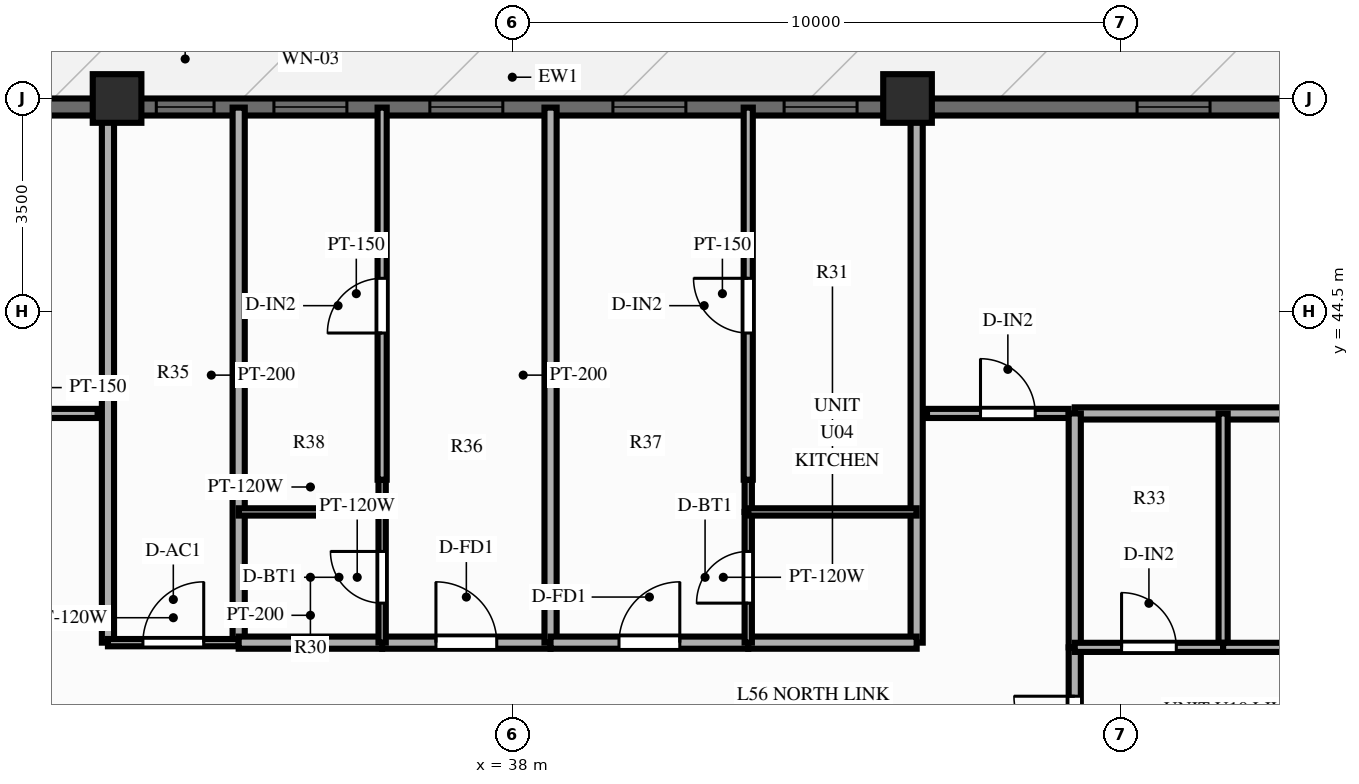
"""IFC4 building model, lengths in metres.
Left out: names, types, materials, properties, quantities, classifications, styles, units other than length and angle.
Written with IfcOpenShell. Run it as: python <this file> out.ifc"""

import sys

from ifc_helpers import new_model, si_unit, direction, frame, frame_2d, origin, origin_2d, place, context, subcontext, project, spatial, rectangle, extrude, source, transform, mapped, element, fill, save


model = new_model("IFC4")
c1 = context("Model", 3, precision=1e-05, world=origin(), true_north=direction((0.0, 1.0)))
c2 = subcontext(c1, "Body", "Model", "MODEL_VIEW")
j1 = project(units=[si_unit("LENGTHUNIT", "METRE"), si_unit("PLANEANGLEUNIT", "RADIAN")], contexts=[c1])
p1 = place(None, origin())
s1 = spatial("IfcSite", under=j1, at=p1, CompositionType="ELEMENT")
p2 = place(p1, origin())
s2 = spatial("IfcBuilding", under=s1, at=p2, CompositionType="ELEMENT")
p3 = place(p2, frame((0.0, 0.0, 179.8)))
s3 = spatial("IfcBuildingStorey", under=s2, at=p3, CompositionType="ELEMENT", Elevation=179.8)
m1 = source(origin(), c2, "Body", "SweptSolid", [
    extrude(rectangle(XDim=0.8, YDim=0.8, at=origin_2d()), origin(), (0.0, 0.0, 1.0), 3.0),
])
for number, where, z_axis, x_axis in (
    (1, (44.5, 48.0, 0.0), (0.0, 0.0, 1.0), (1.0, 0.0, 0.0)),
    (2, (31.5, 48.0, 0.0), (0.0, 0.0, 1.0), (1.0, 0.0, 0.0)),
):
    element("IfcColumn", number, at=place(p3, frame(where, z_axis=z_axis, x_axis=x_axis)), inside=s3, PredefinedType="COLUMN", context=c2, shape_type="MappedRepresentation", body=[
        mapped(m1, transform((0.0, 0.0, 0.0), scale=1.0)),
    ])
p4 = place(p3, frame((22.75, 47.86, 0.0), z_axis=(0.0, 0.0, 1.0), x_axis=(1.0, 0.0, 0.0)))
e3 = element("IfcWall", 3, at=p4, inside=s3, PredefinedType="SOLIDWALL", context=c2, shape_type="SweptSolid", body=[
    extrude(rectangle(XDim=30.5, YDim=0.28, at=frame_2d((15.25, 0.0))), origin(), (0.0, 0.0, 1.0), 2.28),
])
p5 = place(p4, frame((3.825, 0.0, 0.0)))
e4 = element("IfcOpeningElement", 4, at=p5, cuts=e3, PredefinedType="OPENING", context=c2, shape_type="SweptSolid", body=[
    extrude(rectangle(XDim=1.1, YDim=2.15, at=frame_2d((0.55, 1.075))), frame((0.0, 0.152, 0.0), z_axis=(0.0, -1.0, 0.0), x_axis=(1.0, 0.0, 0.0)), (0.0, 0.0, 1.0), 0.304),
])
p6 = place(p4, frame((9.395, 0.0, 0.25)))
e5 = element("IfcOpeningElement", 5, at=p6, cuts=e3, PredefinedType="OPENING", context=c2, shape_type="SweptSolid", body=[
    extrude(rectangle(XDim=0.95, YDim=1.5, at=frame_2d((0.475, 0.75))), frame((0.0, 0.152, 0.0), z_axis=(0.0, -1.0, 0.0), x_axis=(1.0, 0.0, 0.0)), (0.0, 0.0, 1.0), 0.304),
])
p7 = place(p4, frame((11.33, 0.0, 0.25)))
e6 = element("IfcOpeningElement", 6, at=p7, cuts=e3, PredefinedType="OPENING", context=c2, shape_type="SweptSolid", body=[
    extrude(rectangle(XDim=1.2, YDim=1.5, at=frame_2d((0.6, 0.75))), frame((0.0, 0.152, 0.0), z_axis=(0.0, -1.0, 0.0), x_axis=(1.0, 0.0, 0.0)), (0.0, 0.0, 1.0), 0.304),
])
p8 = place(p4, frame((13.894, 0.0, 0.25)))
e7 = element("IfcOpeningElement", 7, at=p8, cuts=e3, PredefinedType="OPENING", context=c2, shape_type="SweptSolid", body=[
    extrude(rectangle(XDim=1.2, YDim=1.5, at=frame_2d((0.6, 0.75))), frame((0.0, 0.152, 0.0), z_axis=(0.0, -1.0, 0.0), x_axis=(1.0, 0.0, 0.0)), (0.0, 0.0, 1.0), 0.304),
])
p9 = place(p4, frame((16.905, 0.0, 0.25)))
e8 = element("IfcOpeningElement", 8, at=p9, cuts=e3, PredefinedType="OPENING", context=c2, shape_type="SweptSolid", body=[
    extrude(rectangle(XDim=1.2, YDim=1.5, at=frame_2d((0.6, 0.75))), frame((0.0, 0.152, 0.0), z_axis=(0.0, -1.0, 0.0), x_axis=(1.0, 0.0, 0.0)), (0.0, 0.0, 1.0), 0.304),
])
p10 = place(p4, frame((19.72, 0.0, 0.25)))
e9 = element("IfcOpeningElement", 9, at=p10, cuts=e3, PredefinedType="OPENING", context=c2, shape_type="SweptSolid", body=[
    extrude(rectangle(XDim=1.2, YDim=1.5, at=frame_2d((0.6, 0.75))), frame((0.0, 0.152, 0.0), z_axis=(0.0, -1.0, 0.0), x_axis=(1.0, 0.0, 0.0)), (0.0, 0.0, 1.0), 0.304),
])
p11 = place(p4, frame((25.525, 0.0, 0.25)))
e10 = element("IfcOpeningElement", 10, at=p11, cuts=e3, PredefinedType="OPENING", context=c2, shape_type="SweptSolid", body=[
    extrude(rectangle(XDim=1.2, YDim=1.5, at=frame_2d((0.6, 0.75))), frame((0.0, 0.152, 0.0), z_axis=(0.0, -1.0, 0.0), x_axis=(1.0, 0.0, 0.0)), (0.0, 0.0, 1.0), 0.304),
])
p12 = place(p3, frame((28.85, 42.82, 0.0), z_axis=(0.0, 0.0, 1.0), x_axis=(1.0, 0.0, 0.0)))
e11 = element("IfcWall", 11, at=p12, inside=s3, PredefinedType="PARTITIONING", context=c2, shape_type="SweptSolid", body=[
    extrude(rectangle(XDim=2.33, YDim=0.15, at=frame_2d((1.165, 0.0))), origin(), (0.0, 0.0, 1.0), 2.79),
])
p13 = place(p12, frame((0.55, 0.0, 0.0)))
e12 = element("IfcOpeningElement", 12, at=p13, cuts=e11, PredefinedType="OPENING", context=c2, shape_type="SweptSolid", body=[
    extrude(rectangle(XDim=0.9, YDim=2.1, at=frame_2d((0.45, 1.05))), frame((0.0, 0.087, 0.0), z_axis=(0.0, -1.0, 0.0), x_axis=(1.0, 0.0, 0.0)), (0.0, 0.0, 1.0), 0.174),
])
p14 = place(p3, frame((44.82, 42.82, 0.0), z_axis=(0.0, 0.0, 1.0), x_axis=(1.0, 0.0, 0.0)))
e13 = element("IfcWall", 13, at=p14, inside=s3, PredefinedType="PARTITIONING", context=c2, shape_type="SweptSolid", body=[
    extrude(rectangle(XDim=2.33, YDim=0.15, at=frame_2d((1.165, 0.0))), origin(), (0.0, 0.0, 1.0), 2.79),
])
p15 = place(p14, frame((0.88, 0.0, 0.0)))
e14 = element("IfcOpeningElement", 14, at=p15, cuts=e13, PredefinedType="OPENING", context=c2, shape_type="SweptSolid", body=[
    extrude(rectangle(XDim=0.9, YDim=2.1, at=frame_2d((0.45, 1.05))), frame((0.0, 0.087, 0.0), z_axis=(0.0, -1.0, 0.0), x_axis=(1.0, 0.0, 0.0)), (0.0, 0.0, 1.0), 0.174),
])
for number, where, z_axis, x_axis in (
    (15, (31.35, 39.05, 0.0), (0.0, 0.0, 1.0), (0.0, 1.0, 0.0)),
    (16, (44.65, 39.05, 0.0), (0.0, 0.0, 1.0), (0.0, 1.0, 0.0)),
):
    element("IfcWall", number, at=place(p3, frame(where, z_axis=z_axis, x_axis=x_axis)), inside=s3, PredefinedType="PARTITIONING", context=c2, shape_type="SweptSolid", body=[
        extrude(rectangle(XDim=8.8, YDim=0.2, at=frame_2d((4.4, 0.0))), origin(), (0.0, 0.0, 1.0), 2.39),
    ])
p16 = place(p3, frame((33.5, 39.05, 0.0), z_axis=(0.0, 0.0, 1.0), x_axis=(0.0, 1.0, 0.0)))
e17 = element("IfcWall", 17, at=p16, inside=s3, PredefinedType="PARTITIONING", context=c2, shape_type="SweptSolid", body=[
    extrude(rectangle(XDim=8.8, YDim=0.2, at=frame_2d((4.4, 0.0))), origin(), (0.0, 0.0, 1.0), 2.79),
])
p17 = place(p3, frame((31.35, 39.05, 0.0), z_axis=(0.0, 0.0, 1.0), x_axis=(1.0, 0.0, 0.0)))
e18 = element("IfcWall", 18, at=p17, inside=s3, PredefinedType="PARTITIONING", context=c2, shape_type="SweptSolid", body=[
    extrude(rectangle(XDim=2.15, YDim=0.12, at=frame_2d((1.075, 0.0))), origin(), (0.0, 0.0, 1.0), 2.79),
])
p18 = place(p17, frame((0.575, 0.0, 0.0)))
e19 = element("IfcOpeningElement", 19, at=p18, cuts=e18, PredefinedType="OPENING", context=c2, shape_type="SweptSolid", body=[
    extrude(rectangle(XDim=1.0, YDim=2.1, at=frame_2d((0.5, 1.05))), frame((0.0, 0.072, 0.0), z_axis=(0.0, -1.0, 0.0), x_axis=(1.0, 0.0, 0.0)), (0.0, 0.0, 1.0), 0.144),
])
p19 = place(p3, frame((33.5, 39.05, 0.0), z_axis=(0.0, 0.0, 1.0), x_axis=(1.0, 0.0, 0.0)))
e20 = element("IfcWall", 20, at=p19, inside=s3, PredefinedType="PARTITIONING", context=c2, shape_type="SweptSolid", body=[
    extrude(rectangle(XDim=2.359, YDim=0.2, at=frame_2d((1.18, 0.0))), origin(), (0.0, 0.0, 1.0), 2.79),
])
p20 = place(p3, frame((35.859, 39.05, 0.0), z_axis=(0.0, 0.0, 1.0), x_axis=(1.0, 0.0, 0.0)))
e21 = element("IfcWall", 21, at=p20, inside=s3, PredefinedType="PARTITIONING", context=c2, shape_type="SweptSolid", body=[
    extrude(rectangle(XDim=2.77, YDim=0.2, at=frame_2d((1.385, 0.0))), origin(), (0.0, 0.0, 1.0), 2.79),
])
p21 = place(p20, frame((0.885, 0.0, 0.0)))
e22 = element("IfcOpeningElement", 22, at=p21, cuts=e21, PredefinedType="OPENING", context=c2, shape_type="SweptSolid", body=[
    extrude(rectangle(XDim=1.0, YDim=2.15, at=frame_2d((0.5, 1.075))), frame((0.0, 0.112, 0.0), z_axis=(0.0, -1.0, 0.0), x_axis=(1.0, 0.0, 0.0)), (0.0, 0.0, 1.0), 0.224),
])
p22 = place(p3, frame((35.859, 39.05, 0.0), z_axis=(0.0, 0.0, 1.0), x_axis=(0.0, 1.0, 0.0)))
e23 = element("IfcWall", 23, at=p22, inside=s3, PredefinedType="PARTITIONING", context=c2, shape_type="SweptSolid", body=[
    extrude(rectangle(XDim=2.15, YDim=0.12, at=frame_2d((1.075, 0.0))), origin(), (0.0, 0.0, 1.0), 2.79),
])
p23 = place(p22, frame((0.65, 0.0, 0.0)))
e24 = element("IfcOpeningElement", 24, at=p23, cuts=e23, PredefinedType="OPENING", context=c2, shape_type="SweptSolid", body=[
    extrude(rectangle(XDim=0.85, YDim=2.05, at=frame_2d((0.425, 1.025))), frame((0.0, 0.072, 0.0), z_axis=(0.0, -1.0, 0.0), x_axis=(1.0, 0.0, 0.0)), (0.0, 0.0, 1.0), 0.144),
])
p24 = place(p3, frame((35.859, 41.2, 0.0), z_axis=(0.0, 0.0, 1.0), x_axis=(0.0, 1.0, 0.0)))
e25 = element("IfcWall", 25, at=p24, inside=s3, PredefinedType="PARTITIONING", context=c2, shape_type="SweptSolid", body=[
    extrude(rectangle(XDim=0.53, YDim=0.12, at=frame_2d((0.265, 0.0))), origin(), (0.0, 0.0, 1.0), 2.79),
])
p25 = place(p3, frame((33.5, 41.2, 0.0), z_axis=(0.0, 0.0, 1.0), x_axis=(1.0, 0.0, 0.0)))
e26 = element("IfcWall", 26, at=p25, inside=s3, PredefinedType="PARTITIONING", context=c2, shape_type="SweptSolid", body=[
    extrude(rectangle(XDim=2.359, YDim=0.12, at=frame_2d((1.18, 0.0))), origin(), (0.0, 0.0, 1.0), 2.79),
])
p26 = place(p3, frame((35.859, 41.73, 0.0), z_axis=(0.0, 0.0, 1.0), x_axis=(0.0, 1.0, 0.0)))
e27 = element("IfcWall", 27, at=p26, inside=s3, PredefinedType="PARTITIONING", context=c2, shape_type="SweptSolid", body=[
    extrude(rectangle(XDim=6.12, YDim=0.15, at=frame_2d((3.06, 0.0))), origin(), (0.0, 0.0, 1.0), 2.79),
])
p27 = place(p26, frame((2.413, 0.0, 0.0)))
e28 = element("IfcOpeningElement", 28, at=p27, cuts=e27, PredefinedType="OPENING", context=c2, shape_type="SweptSolid", body=[
    extrude(rectangle(XDim=0.9, YDim=2.1, at=frame_2d((0.45, 1.05))), frame((0.0, 0.087, 0.0), z_axis=(0.0, -1.0, 0.0), x_axis=(1.0, 0.0, 0.0)), (0.0, 0.0, 1.0), 0.174),
])
p28 = place(p3, frame((38.629, 39.05, 0.0), z_axis=(0.0, 0.0, 1.0), x_axis=(0.0, 1.0, 0.0)))
e29 = element("IfcWall", 29, at=p28, inside=s3, PredefinedType="PARTITIONING", context=c2, shape_type="SweptSolid", body=[
    extrude(rectangle(XDim=8.8, YDim=0.2, at=frame_2d((4.4, 0.0))), origin(), (0.0, 0.0, 1.0), 2.79),
])
p29 = place(p3, frame((38.629, 39.05, 0.0), z_axis=(0.0, 0.0, 1.0), x_axis=(1.0, 0.0, 0.0)))
e30 = element("IfcWall", 30, at=p29, inside=s3, PredefinedType="PARTITIONING", context=c2, shape_type="SweptSolid", body=[
    extrude(rectangle(XDim=3.251, YDim=0.2, at=frame_2d((1.626, 0.0))), origin(), (0.0, 0.0, 1.0), 2.79),
])
p30 = place(p29, frame((1.126, 0.0, 0.0)))
e31 = element("IfcOpeningElement", 31, at=p30, cuts=e30, PredefinedType="OPENING", context=c2, shape_type="SweptSolid", body=[
    extrude(rectangle(XDim=1.0, YDim=2.15, at=frame_2d((0.5, 1.075))), frame((0.0, 0.112, 0.0), z_axis=(0.0, -1.0, 0.0), x_axis=(1.0, 0.0, 0.0)), (0.0, 0.0, 1.0), 0.224),
])
p31 = place(p3, frame((41.88, 39.05, 0.0), z_axis=(0.0, 0.0, 1.0), x_axis=(1.0, 0.0, 0.0)))
e32 = element("IfcWall", 32, at=p31, inside=s3, PredefinedType="PARTITIONING", context=c2, shape_type="SweptSolid", body=[
    extrude(rectangle(XDim=2.77, YDim=0.2, at=frame_2d((1.385, 0.0))), origin(), (0.0, 0.0, 1.0), 2.79),
])
p32 = place(p3, frame((41.88, 39.05, 0.0), z_axis=(0.0, 0.0, 1.0), x_axis=(0.0, 1.0, 0.0)))
e33 = element("IfcWall", 33, at=p32, inside=s3, PredefinedType="PARTITIONING", context=c2, shape_type="SweptSolid", body=[
    extrude(rectangle(XDim=2.15, YDim=0.12, at=frame_2d((1.075, 0.0))), origin(), (0.0, 0.0, 1.0), 2.79),
])
p33 = place(p32, frame((0.65, 0.0, 0.0)))
e34 = element("IfcOpeningElement", 34, at=p33, cuts=e33, PredefinedType="OPENING", context=c2, shape_type="SweptSolid", body=[
    extrude(rectangle(XDim=0.85, YDim=2.05, at=frame_2d((0.425, 1.025))), frame((0.0, 0.072, 0.0), z_axis=(0.0, -1.0, 0.0), x_axis=(1.0, 0.0, 0.0)), (0.0, 0.0, 1.0), 0.144),
])
p34 = place(p3, frame((41.88, 41.2, 0.0), z_axis=(0.0, 0.0, 1.0), x_axis=(0.0, 1.0, 0.0)))
e35 = element("IfcWall", 35, at=p34, inside=s3, PredefinedType="PARTITIONING", context=c2, shape_type="SweptSolid", body=[
    extrude(rectangle(XDim=0.53, YDim=0.12, at=frame_2d((0.265, 0.0))), origin(), (0.0, 0.0, 1.0), 2.79),
])
p35 = place(p3, frame((41.88, 41.2, 0.0), z_axis=(0.0, 0.0, 1.0), x_axis=(1.0, 0.0, 0.0)))
e36 = element("IfcWall", 36, at=p35, inside=s3, PredefinedType="PARTITIONING", context=c2, shape_type="SweptSolid", body=[
    extrude(rectangle(XDim=2.77, YDim=0.12, at=frame_2d((1.385, 0.0))), origin(), (0.0, 0.0, 1.0), 2.79),
])
p36 = place(p3, frame((41.88, 41.73, 0.0), z_axis=(0.0, 0.0, 1.0), x_axis=(0.0, 1.0, 0.0)))
e37 = element("IfcWall", 37, at=p36, inside=s3, PredefinedType="PARTITIONING", context=c2, shape_type="SweptSolid", body=[
    extrude(rectangle(XDim=6.12, YDim=0.15, at=frame_2d((3.06, 0.0))), origin(), (0.0, 0.0, 1.0), 2.79),
])
p37 = place(p36, frame((2.413, 0.0, 0.0)))
e38 = element("IfcOpeningElement", 38, at=p37, cuts=e37, PredefinedType="OPENING", context=c2, shape_type="SweptSolid", body=[
    extrude(rectangle(XDim=0.9, YDim=2.1, at=frame_2d((0.45, 1.05))), frame((0.0, 0.087, 0.0), z_axis=(0.0, -1.0, 0.0), x_axis=(1.0, 0.0, 0.0)), (0.0, 0.0, 1.0), 0.174),
])
p38 = place(p3, frame((47.25, 42.82, 0.0), z_axis=(0.0, 0.0, 1.0), x_axis=(1.0, 0.0, 0.0)))
e39 = element("IfcWall", 39, at=p38, inside=s3, PredefinedType="PARTITIONING", context=c2, shape_type="SweptSolid", body=[
    extrude(rectangle(XDim=10.85, YDim=0.2, at=frame_2d((5.425, 0.0))), origin(), (0.0, 0.0, 1.0), 2.79),
])
p39 = place(p3, frame((47.25, 35.445, 0.0), z_axis=(0.0, 0.0, 1.0), x_axis=(0.0, 1.0, 0.0)))
e40 = element("IfcWall", 40, at=p39, inside=s3, PredefinedType="PARTITIONING", context=c2, shape_type="SweptSolid", body=[
    extrude(rectangle(XDim=3.527, YDim=0.2, at=frame_2d((1.764, 0.0))), origin(), (0.0, 0.0, 1.0), 2.79),
])
p40 = place(p39, frame((1.724, 0.0, 0.0)))
e41 = element("IfcOpeningElement", 41, at=p40, cuts=e40, PredefinedType="OPENING", context=c2, shape_type="SweptSolid", body=[
    extrude(rectangle(XDim=1.0, YDim=2.15, at=frame_2d((0.5, 1.075))), frame((0.0, 0.112, 0.0), z_axis=(0.0, -1.0, 0.0), x_axis=(1.0, 0.0, 0.0)), (0.0, 0.0, 1.0), 0.224),
])
p41 = place(p3, frame((47.25, 38.973, 0.0), z_axis=(0.0, 0.0, 1.0), x_axis=(0.0, 1.0, 0.0)))
e42 = element("IfcWall", 42, at=p41, inside=s3, PredefinedType="PARTITIONING", context=c2, shape_type="SweptSolid", body=[
    extrude(rectangle(XDim=3.847, YDim=0.2, at=frame_2d((1.924, 0.0))), origin(), (0.0, 0.0, 1.0), 2.79),
])
p42 = place(p3, frame((49.69, 38.973, 0.0), z_axis=(0.0, 0.0, 1.0), x_axis=(0.0, 1.0, 0.0)))
e43 = element("IfcWall", 43, at=p42, inside=s3, PredefinedType="PARTITIONING", context=c2, shape_type="SweptSolid", body=[
    extrude(rectangle(XDim=3.847, YDim=0.15, at=frame_2d((1.924, 0.0))), origin(), (0.0, 0.0, 1.0), 2.79),
])
p43 = place(p3, frame((47.25, 38.973, 0.0), z_axis=(0.0, 0.0, 1.0), x_axis=(1.0, 0.0, 0.0)))
e44 = element("IfcWall", 44, at=p43, inside=s3, PredefinedType="PARTITIONING", context=c2, shape_type="SweptSolid", body=[
    extrude(rectangle(XDim=2.44, YDim=0.15, at=frame_2d((1.22, 0.0))), origin(), (0.0, 0.0, 1.0), 2.79),
])
p44 = place(p43, frame((0.77, 0.0, 0.0)))
e45 = element("IfcOpeningElement", 45, at=p44, cuts=e44, PredefinedType="OPENING", context=c2, shape_type="SweptSolid", body=[
    extrude(rectangle(XDim=0.9, YDim=2.1, at=frame_2d((0.45, 1.05))), frame((0.0, 0.087, 0.0), z_axis=(0.0, -1.0, 0.0), x_axis=(1.0, 0.0, 0.0)), (0.0, 0.0, 1.0), 0.174),
])
p45 = place(p3, frame((49.69, 38.973, 0.0), z_axis=(0.0, 0.0, 1.0), x_axis=(1.0, 0.0, 0.0)))
e46 = element("IfcWall", 46, at=p45, inside=s3, PredefinedType="PARTITIONING", context=c2, shape_type="SweptSolid", body=[
    extrude(rectangle(XDim=8.41, YDim=0.15, at=frame_2d((4.205, 0.0))), origin(), (0.0, 0.0, 1.0), 2.79),
])
p46 = place(p45, frame((3.462, 0.0, 0.0)))
e47 = element("IfcOpeningElement", 47, at=p46, cuts=e46, PredefinedType="OPENING", context=c2, shape_type="SweptSolid", body=[
    extrude(rectangle(XDim=0.9, YDim=2.1, at=frame_2d((0.45, 1.05))), frame((0.0, 0.087, 0.0), z_axis=(0.0, -1.0, 0.0), x_axis=(1.0, 0.0, 0.0)), (0.0, 0.0, 1.0), 0.174),
])
m2 = source(origin(), c2, "Body", "SweptSolid", [
    extrude(rectangle(XDim=0.95, YDim=1.5, at=frame_2d((0.475, 0.75))), frame((0.0, 0.03, 0.0), z_axis=(0.0, -1.0, 0.0), x_axis=(1.0, 0.0, 0.0)), (0.0, 0.0, 1.0), 0.06),
])
p47 = place(p6, origin())
e48 = element("IfcWindow", 48, at=p47, inside=s3, PartitioningType="SINGLE_PANEL", PredefinedType="WINDOW", context=c2, shape_type="MappedRepresentation", body=[
    mapped(m2, transform((0.0, 0.0, 0.0), scale=1.0)),
])
fill(e5, e48)
m3 = source(origin(), c2, "Body", "SweptSolid", [
    extrude(rectangle(XDim=1.2, YDim=1.5, at=frame_2d((0.6, 0.75))), frame((0.0, 0.03, 0.0), z_axis=(0.0, -1.0, 0.0), x_axis=(1.0, 0.0, 0.0)), (0.0, 0.0, 1.0), 0.06),
])
p48 = place(p7, origin())
e49 = element("IfcWindow", 49, at=p48, inside=s3, PartitioningType="SINGLE_PANEL", PredefinedType="WINDOW", context=c2, shape_type="MappedRepresentation", body=[
    mapped(m3, transform((0.0, 0.0, 0.0), scale=1.0)),
])
fill(e6, e49)
p49 = place(p8, origin())
e50 = element("IfcWindow", 50, at=p49, inside=s3, PartitioningType="SINGLE_PANEL", PredefinedType="WINDOW", context=c2, shape_type="MappedRepresentation", body=[
    mapped(m3, transform((0.0, 0.0, 0.0), scale=1.0)),
])
fill(e7, e50)
p50 = place(p9, origin())
e51 = element("IfcWindow", 51, at=p50, inside=s3, PartitioningType="SINGLE_PANEL", PredefinedType="WINDOW", context=c2, shape_type="MappedRepresentation", body=[
    mapped(m3, transform((0.0, 0.0, 0.0), scale=1.0)),
])
fill(e8, e51)
p51 = place(p10, origin())
e52 = element("IfcWindow", 52, at=p51, inside=s3, PartitioningType="SINGLE_PANEL", PredefinedType="WINDOW", context=c2, shape_type="MappedRepresentation", body=[
    mapped(m3, transform((0.0, 0.0, 0.0), scale=1.0)),
])
fill(e9, e52)
p52 = place(p11, origin())
e53 = element("IfcWindow", 53, at=p52, inside=s3, PartitioningType="SINGLE_PANEL", PredefinedType="WINDOW", context=c2, shape_type="MappedRepresentation", body=[
    mapped(m3, transform((0.0, 0.0, 0.0), scale=1.0)),
])
fill(e10, e53)
m4 = source(origin(), c2, "Body", "SweptSolid", [
    extrude(rectangle(XDim=0.9, YDim=2.1, at=frame_2d((0.45, 1.05))), frame((0.0, 0.025, 0.0), z_axis=(0.0, -1.0, 0.0), x_axis=(1.0, 0.0, 0.0)), (0.0, 0.0, 1.0), 0.05),
])
p53 = place(p15, origin())
e54 = element("IfcDoor", 54, at=p53, inside=s3, OperationType="SINGLE_SWING_LEFT", PredefinedType="DOOR", context=c2, shape_type="MappedRepresentation", body=[
    mapped(m4, transform((0.0, 0.0, 0.0), scale=1.0)),
])
fill(e14, e54)
m5 = source(origin(), c2, "Body", "SweptSolid", [
    extrude(rectangle(XDim=1.0, YDim=2.1, at=frame_2d((0.5, 1.05))), frame((0.0, 0.025, 0.0), z_axis=(0.0, -1.0, 0.0), x_axis=(1.0, 0.0, 0.0)), (0.0, 0.0, 1.0), 0.05),
])
p54 = place(p18, origin())
e55 = element("IfcDoor", 55, at=p54, inside=s3, OperationType="SINGLE_SWING_RIGHT", PredefinedType="DOOR", context=c2, shape_type="MappedRepresentation", body=[
    mapped(m5, transform((0.0, 0.0, 0.0), scale=1.0)),
])
fill(e19, e55)
m6 = source(origin(), c2, "Body", "SweptSolid", [
    extrude(rectangle(XDim=1.0, YDim=2.15, at=frame_2d((0.5, 1.075))), frame((0.0, 0.025, 0.0), z_axis=(0.0, -1.0, 0.0), x_axis=(1.0, 0.0, 0.0)), (0.0, 0.0, 1.0), 0.05),
])
p55 = place(p21, origin())
e56 = element("IfcDoor", 56, at=p55, inside=s3, OperationType="SINGLE_SWING_LEFT", PredefinedType="DOOR", context=c2, shape_type="MappedRepresentation", body=[
    mapped(m6, transform((0.0, 0.0, 0.0), scale=1.0)),
])
fill(e22, e56)
m7 = source(origin(), c2, "Body", "SweptSolid", [
    extrude(rectangle(XDim=0.85, YDim=2.05, at=frame_2d((0.425, 1.025))), frame((0.0, 0.025, 0.0), z_axis=(0.0, -1.0, 0.0), x_axis=(1.0, 0.0, 0.0)), (0.0, 0.0, 1.0), 0.05),
])
p56 = place(p23, origin())
e57 = element("IfcDoor", 57, at=p56, inside=s3, OperationType="SINGLE_SWING_RIGHT", PredefinedType="DOOR", context=c2, shape_type="MappedRepresentation", body=[
    mapped(m7, transform((0.0, 0.0, 0.0), scale=1.0)),
])
fill(e24, e57)
p57 = place(p27, origin())
e58 = element("IfcDoor", 58, at=p57, inside=s3, OperationType="SINGLE_SWING_LEFT", PredefinedType="DOOR", context=c2, shape_type="MappedRepresentation", body=[
    mapped(m4, transform((0.0, 0.0, 0.0), scale=1.0)),
])
fill(e28, e58)
p58 = place(p30, origin())
e59 = element("IfcDoor", 59, at=p58, inside=s3, OperationType="SINGLE_SWING_RIGHT", PredefinedType="DOOR", context=c2, shape_type="MappedRepresentation", body=[
    mapped(m6, transform((0.0, 0.0, 0.0), scale=1.0)),
])
fill(e31, e59)
p59 = place(p33, origin())
e60 = element("IfcDoor", 60, at=p59, inside=s3, OperationType="SINGLE_SWING_LEFT", PredefinedType="DOOR", context=c2, shape_type="MappedRepresentation", body=[
    mapped(m7, transform((0.0, 0.0, 0.0), scale=1.0)),
])
fill(e34, e60)
p60 = place(p37, origin())
e61 = element("IfcDoor", 61, at=p60, inside=s3, OperationType="SINGLE_SWING_RIGHT", PredefinedType="DOOR", context=c2, shape_type="MappedRepresentation", body=[
    mapped(m4, transform((0.0, 0.0, 0.0), scale=1.0)),
])
fill(e38, e61)
p61 = place(p40, origin())
e62 = element("IfcDoor", 62, at=p61, inside=s3, OperationType="SINGLE_SWING_RIGHT", PredefinedType="DOOR", context=c2, shape_type="MappedRepresentation", body=[
    mapped(m6, transform((0.0, 0.0, 0.0), scale=1.0)),
])
fill(e41, e62)
p62 = place(p44, origin())
e63 = element("IfcDoor", 63, at=p62, inside=s3, OperationType="SINGLE_SWING_LEFT", PredefinedType="DOOR", context=c2, shape_type="MappedRepresentation", body=[
    mapped(m4, transform((0.0, 0.0, 0.0), scale=1.0)),
])
fill(e45, e63)
save(model, sys.argv[1])
